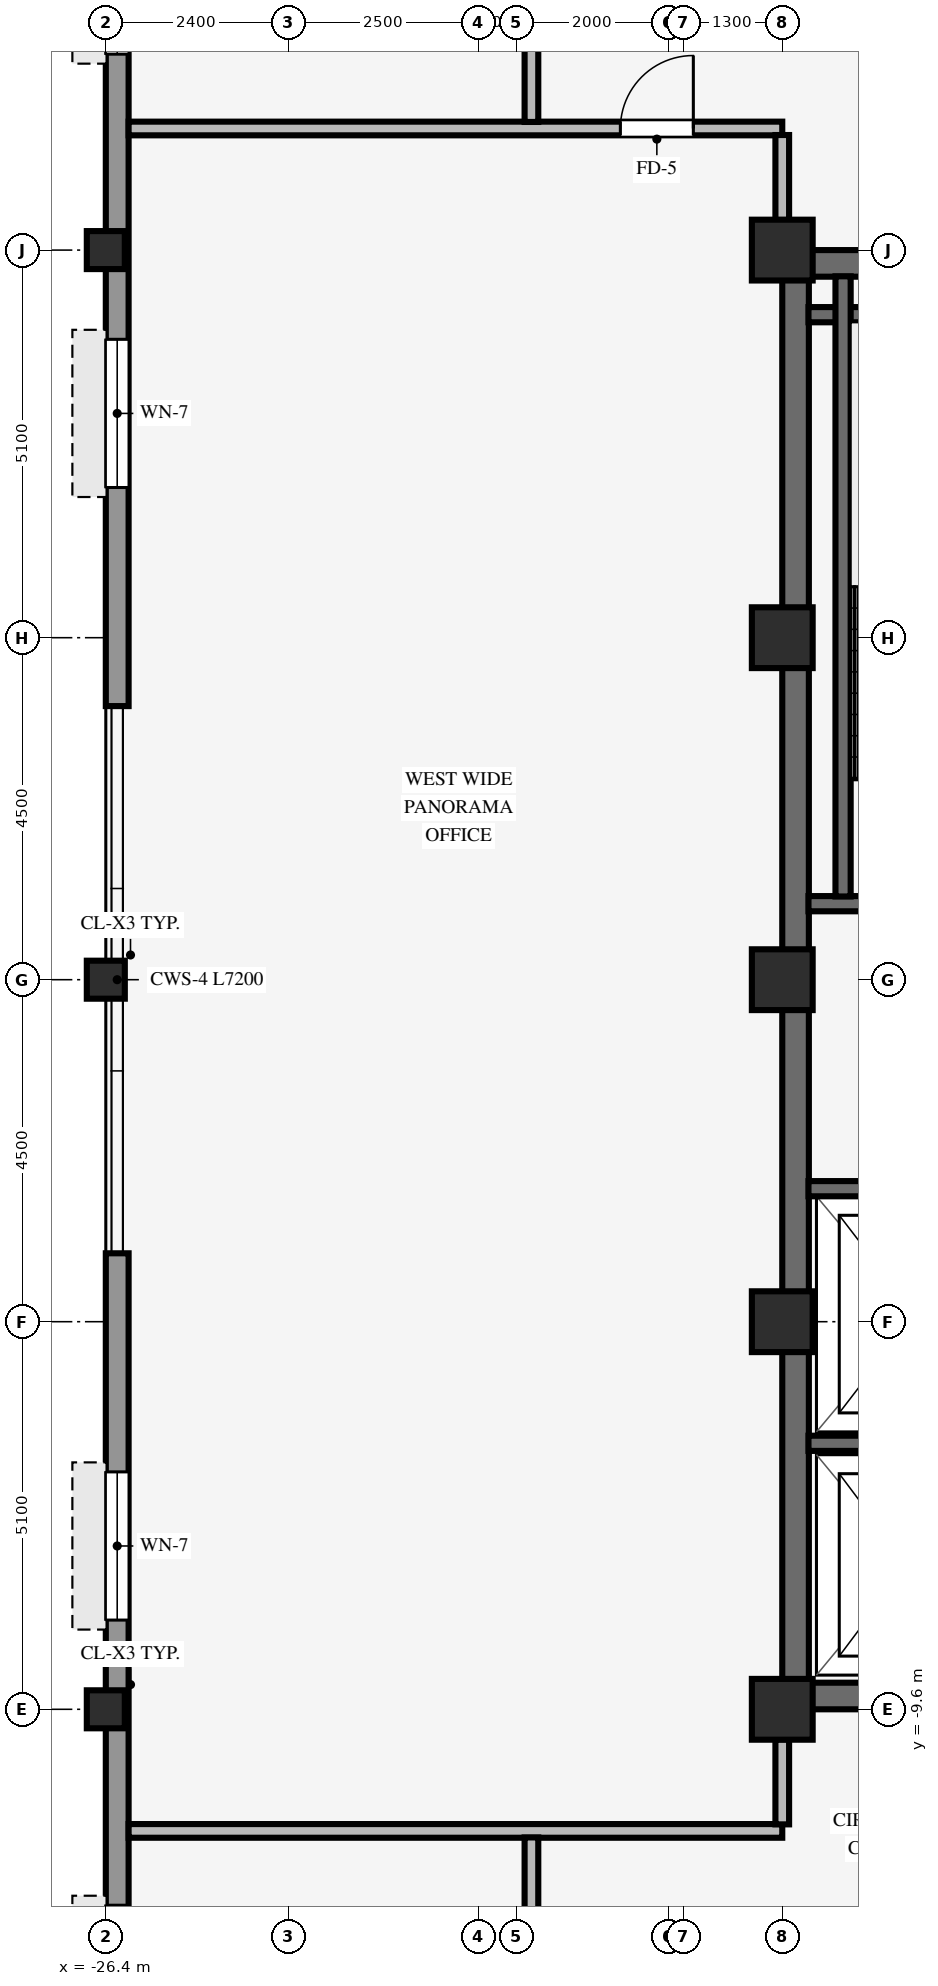
"""IFC4 building model, lengths in metres.
Left out: names, types, materials, properties, quantities, classifications, styles, units other than length and angle.
Written with IfcOpenShell. Run it as: python <this file> out.ifc"""

import sys

from ifc_helpers import new_model, si_unit, direction, frame, frame_2d, origin, origin_2d, place, context, subcontext, project, spatial, rectangle, hollow_rectangle, extrude, source, transform, mapped, element, fill, save


model = new_model("IFC4")
c1 = context("Model", 3, precision=1e-05, world=origin(), true_north=direction((0.0, 1.0)))
c2 = subcontext(c1, "Body", "Model", "MODEL_VIEW")
j1 = project(units=[si_unit("LENGTHUNIT", "METRE"), si_unit("PLANEANGLEUNIT", "RADIAN")], contexts=[c1])
p1 = place(None, origin())
s1 = spatial("IfcSite", under=j1, at=p1, CompositionType="ELEMENT")
p2 = place(p1, origin())
s2 = spatial("IfcBuilding", under=s1, at=p2, CompositionType="ELEMENT")
p3 = place(p2, frame((0.0, 0.0, 227.4)))
s3 = spatial("IfcBuildingStorey", under=s2, at=p3, CompositionType="ELEMENT", Elevation=227.4)
for number, where, z_axis, x_axis in (
    (1, (-17.5, -9.425, 0.0), (0.0, 0.0, 1.0), (1.0, 0.0, 0.0)),
    (2, (-17.5, 9.425, 0.0), (0.0, 0.0, 1.0), (1.0, 0.0, 0.0)),
):
    element("IfcWall", number, at=place(p3, frame(where, z_axis=z_axis, x_axis=x_axis)), inside=s3, PredefinedType="SHEAR", context=c2, shape_type="SweptSolid", body=[
        extrude(rectangle(XDim=8.5, YDim=0.35, at=frame_2d((4.25, 0.0))), origin(), (0.0, 0.0, 1.0), 3.37),
    ])
p4 = place(p3, frame((-17.325, -9.255, 0.0), z_axis=(0.0, 0.0, 1.0), x_axis=(0.0, 1.0, 0.0)))
e3 = element("IfcWall", 3, at=p4, inside=s3, PredefinedType="SHEAR", context=c2, shape_type="SweptSolid", body=[
    extrude(rectangle(XDim=18.51, YDim=0.35, at=frame_2d((9.255, 0.0))), origin(), (0.0, 0.0, 1.0), 3.37),
])
for number, where, z_axis, x_axis in (
    (4, (-17.5, -9.6, 0.0), (0.0, 0.0, 1.0), (1.0, 0.0, 0.0)),
    (5, (-17.5, -4.5, 0.0), (0.0, 0.0, 1.0), (1.0, 0.0, 0.0)),
    (6, (-17.5, 4.5, 0.0), (0.0, 0.0, 1.0), (1.0, 0.0, 0.0)),
    (7, (-17.5, 9.6, 0.0), (0.0, 0.0, 1.0), (1.0, 0.0, 0.0)),
    (8, (-17.5, 0.0, 0.0), (0.0, 0.0, 1.0), (1.0, 0.0, 0.0)),
):
    element("IfcColumn", number, at=place(p3, frame(where, z_axis=z_axis, x_axis=x_axis)), inside=s3, PredefinedType="COLUMN", context=c2, shape_type="SweptSolid", body=[
        extrude(rectangle(XDim=0.8, YDim=0.8, at=origin_2d()), origin(), (0.0, 0.0, 1.0), 3.37),
    ])
for number, where, z_axis, x_axis in (
    (9, (-26.4, -9.6, 0.0), (0.0, 0.0, 1.0), (1.0, 0.0, 0.0)),
    (10, (-26.4, 0.0, 0.0), (0.0, 0.0, 1.0), (1.0, 0.0, 0.0)),
    (11, (-26.4, 9.6, 0.0), (0.0, 0.0, 1.0), (1.0, 0.0, 0.0)),
):
    element("IfcColumn", number, at=place(p3, frame(where, z_axis=z_axis, x_axis=x_axis)), inside=s3, PredefinedType="COLUMN", context=c2, shape_type="SweptSolid", body=[
        extrude(hollow_rectangle(XDim=0.5, YDim=0.5, WallThickness=0.032, InnerFilletRadius=0.032, OuterFilletRadius=0.064, at=origin_2d()), origin(), (0.0, 0.0, 1.0), 3.37),
    ])
p5 = place(p3, frame((-26.25, -17.004, 0.0), z_axis=(0.0, 0.0, 1.0), x_axis=(0.0, 1.0, 0.0)))
e12 = element("IfcWall", 12, at=p5, inside=s3, PredefinedType="STANDARD", context=c2, shape_type="SweptSolid", body=[
    extrude(rectangle(XDim=13.404, YDim=0.3, at=frame_2d((6.702, 0.0))), origin(), (0.0, 0.0, 1.0), 2.705),
])
p6 = place(p5, frame((2.876, 0.0, 0.8)))
e13 = element("IfcOpeningElement", 13, at=p6, cuts=e12, PredefinedType="OPENING", context=c2, shape_type="SweptSolid", body=[
    extrude(rectangle(XDim=1.95, YDim=1.48, at=frame_2d((0.975, 0.74))), frame((0.0, 0.16, 0.0), z_axis=(0.0, -1.0, 0.0), x_axis=(1.0, 0.0, 0.0)), (0.0, 0.0, 1.0), 0.32),
])
p7 = place(p5, frame((8.578, 0.0, 0.8)))
e14 = element("IfcOpeningElement", 14, at=p7, cuts=e12, PredefinedType="OPENING", context=c2, shape_type="SweptSolid", body=[
    extrude(rectangle(XDim=1.95, YDim=1.48, at=frame_2d((0.975, 0.74))), frame((0.0, 0.16, 0.0), z_axis=(0.0, -1.0, 0.0), x_axis=(1.0, 0.0, 0.0)), (0.0, 0.0, 1.0), 0.32),
])
p8 = place(p3, frame((-26.25, 3.6, 0.0), z_axis=(0.0, 0.0, 1.0), x_axis=(0.0, 1.0, 0.0)))
e15 = element("IfcWall", 15, at=p8, inside=s3, PredefinedType="STANDARD", context=c2, shape_type="SweptSolid", body=[
    extrude(rectangle(XDim=13.404, YDim=0.3, at=frame_2d((6.702, 0.0))), origin(), (0.0, 0.0, 1.0), 2.705),
])
p9 = place(p8, frame((2.876, 0.0, 0.8)))
e16 = element("IfcOpeningElement", 16, at=p9, cuts=e15, PredefinedType="OPENING", context=c2, shape_type="SweptSolid", body=[
    extrude(rectangle(XDim=1.95, YDim=1.48, at=frame_2d((0.975, 0.74))), frame((0.0, 0.16, 0.0), z_axis=(0.0, -1.0, 0.0), x_axis=(1.0, 0.0, 0.0)), (0.0, 0.0, 1.0), 0.32),
])
p10 = place(p8, frame((8.578, 0.0, 0.8)))
e17 = element("IfcOpeningElement", 17, at=p10, cuts=e15, PredefinedType="OPENING", context=c2, shape_type="SweptSolid", body=[
    extrude(rectangle(XDim=1.95, YDim=1.48, at=frame_2d((0.975, 0.74))), frame((0.0, 0.16, 0.0), z_axis=(0.0, -1.0, 0.0), x_axis=(1.0, 0.0, 0.0)), (0.0, 0.0, 1.0), 0.32),
])
for number, where, z_axis, x_axis in (
    (18, (-17.155, 1.0, 0.0), (0.0, 0.0, 1.0), (1.0, 0.0, 0.0)),
    (19, (-17.155, 8.75, 0.0), (0.0, 0.0, 1.0), (1.0, 0.0, 0.0)),
):
    element("IfcWall", number, at=place(p3, frame(where, z_axis=z_axis, x_axis=x_axis)), inside=s3, PredefinedType="SHEAR", context=c2, shape_type="SweptSolid", body=[
        extrude(rectangle(XDim=3.62, YDim=0.2, at=frame_2d((1.81, 0.0))), origin(), (0.0, 0.0, 1.0), 3.37),
    ])
p11 = place(p3, frame((-16.7, 1.095, 0.0), z_axis=(0.0, 0.0, 1.0), x_axis=(0.0, 1.0, 0.0)))
e20 = element("IfcWall", 20, at=p11, inside=s3, PredefinedType="SHEAR", context=c2, shape_type="SweptSolid", body=[
    extrude(rectangle(XDim=8.16, YDim=0.2, at=frame_2d((4.08, 0.0))), origin(), (0.0, 0.0, 1.0), 3.37),
])
p12 = place(p3, frame((-17.155, -6.1, 0.0), z_axis=(0.0, 0.0, 1.0), x_axis=(1.0, 0.0, 0.0)))
e21 = element("IfcWall", 21, at=p12, inside=s3, PredefinedType="SHEAR", context=c2, shape_type="SweptSolid", body=[
    extrude(rectangle(XDim=2.905, YDim=0.2, at=frame_2d((1.453, 0.0))), origin(), (0.0, 0.0, 1.0), 3.37),
])
p13 = place(p3, frame((-17.155, -2.75, 0.0), z_axis=(0.0, 0.0, 1.0), x_axis=(1.0, 0.0, 0.0)))
e22 = element("IfcWall", 22, at=p13, inside=s3, PredefinedType="SHEAR", context=c2, shape_type="SweptSolid", body=[
    extrude(rectangle(XDim=2.71, YDim=0.2, at=frame_2d((1.355, 0.0))), origin(), (0.0, 0.0, 1.0), 3.37),
])
p14 = place(p3, frame((-26.1, -11.2, 0.0), z_axis=(0.0, 0.0, 1.0), x_axis=(1.0, 0.0, 0.0)))
e23 = element("IfcWall", 23, at=p14, inside=s3, PredefinedType="PARTITIONING", context=c2, shape_type="SweptSolid", body=[
    extrude(rectangle(XDim=8.6, YDim=0.18, at=frame_2d((4.3, 0.0))), origin(), (0.0, 0.0, 1.0), 3.36),
])
p15 = place(p3, frame((-26.1, 11.2, 0.0), z_axis=(0.0, 0.0, 1.0), x_axis=(1.0, 0.0, 0.0)))
e24 = element("IfcWall", 24, at=p15, inside=s3, PredefinedType="PARTITIONING", context=c2, shape_type="SweptSolid", body=[
    extrude(rectangle(XDim=8.6, YDim=0.18, at=frame_2d((4.3, 0.0))), origin(), (0.0, 0.0, 1.0), 3.36),
])
p16 = place(p15, frame((6.47, 0.0, 0.0)))
e25 = element("IfcOpeningElement", 25, at=p16, cuts=e24, PredefinedType="OPENING", context=c2, shape_type="SweptSolid", body=[
    extrude(rectangle(XDim=0.96, YDim=2.1, at=frame_2d((0.48, 1.05))), frame((0.0, 0.1, 0.0), z_axis=(0.0, -1.0, 0.0), x_axis=(1.0, 0.0, 0.0)), (0.0, 0.0, 1.0), 0.2),
])
for number, where, z_axis, x_axis in (
    (26, (-20.8, -13.514, 0.0), (0.0, 0.0, 1.0), (0.0, 1.0, 0.0)),
    (27, (-20.8, 11.286, 0.0), (0.0, 0.0, 1.0), (0.0, 1.0, 0.0)),
):
    element("IfcWall", number, at=place(p3, frame(where, z_axis=z_axis, x_axis=x_axis)), inside=s3, PredefinedType="PARTITIONING", context=c2, shape_type="SweptSolid", body=[
        extrude(rectangle(XDim=2.228, YDim=0.18, at=frame_2d((1.114, 0.0))), origin(), (0.0, 0.0, 1.0), 3.36),
    ])
for number, where, z_axis, x_axis in (
    (28, (-17.5, -11.114, 0.0), (0.0, 0.0, 1.0), (0.0, 1.0, 0.0)),
    (29, (-17.5, 9.996, 0.0), (0.0, 0.0, 1.0), (0.0, 1.0, 0.0)),
):
    element("IfcWall", number, at=place(p3, frame(where, z_axis=z_axis, x_axis=x_axis)), inside=s3, PredefinedType="PARTITIONING", context=c2, shape_type="SweptSolid", body=[
        extrude(rectangle(XDim=1.118, YDim=0.18, at=frame_2d((0.559, 0.0))), origin(), (0.0, 0.0, 1.0), 2.892),
    ])
m1 = source(origin(), c2, "Body", "SweptSolid", [
    extrude(rectangle(XDim=1.95, YDim=1.48, at=frame_2d((0.975, 0.74))), frame((0.0, 0.03, 0.0), z_axis=(0.0, -1.0, 0.0), x_axis=(1.0, 0.0, 0.0)), (0.0, 0.0, 1.0), 0.06),
])
p17 = place(p6, origin())
e30 = element("IfcWindow", 30, at=p17, inside=s3, PartitioningType="SINGLE_PANEL", PredefinedType="WINDOW", context=c2, shape_type="MappedRepresentation", body=[
    mapped(m1, transform((0.0, 0.0, 0.0), scale=1.0)),
])
fill(e13, e30)
p18 = place(p7, origin())
e31 = element("IfcWindow", 31, at=p18, inside=s3, PartitioningType="SINGLE_PANEL", PredefinedType="WINDOW", context=c2, shape_type="MappedRepresentation", body=[
    mapped(m1, transform((0.0, 0.0, 0.0), scale=1.0)),
])
fill(e14, e31)
p19 = place(p9, origin())
e32 = element("IfcWindow", 32, at=p19, inside=s3, PartitioningType="SINGLE_PANEL", PredefinedType="WINDOW", context=c2, shape_type="MappedRepresentation", body=[
    mapped(m1, transform((0.0, 0.0, 0.0), scale=1.0)),
])
fill(e16, e32)
p20 = place(p10, origin())
e33 = element("IfcWindow", 33, at=p20, inside=s3, PartitioningType="SINGLE_PANEL", PredefinedType="WINDOW", context=c2, shape_type="MappedRepresentation", body=[
    mapped(m1, transform((0.0, 0.0, 0.0), scale=1.0)),
])
fill(e17, e33)
m2 = source(origin(), c2, "Body", "SweptSolid", [
    extrude(rectangle(XDim=0.96, YDim=2.1, at=frame_2d((0.48, 1.05))), frame((0.0, 0.025, 0.0), z_axis=(0.0, -1.0, 0.0), x_axis=(1.0, 0.0, 0.0)), (0.0, 0.0, 1.0), 0.05),
])
p21 = place(p16, origin())
e34 = element("IfcDoor", 34, at=p21, inside=s3, OperationType="SINGLE_SWING_RIGHT", PredefinedType="DOOR", context=c2, shape_type="MappedRepresentation", body=[
    mapped(m2, transform((0.0, 0.0, 0.0), scale=1.0)),
])
fill(e25, e34)
save(model, sys.argv[1])
